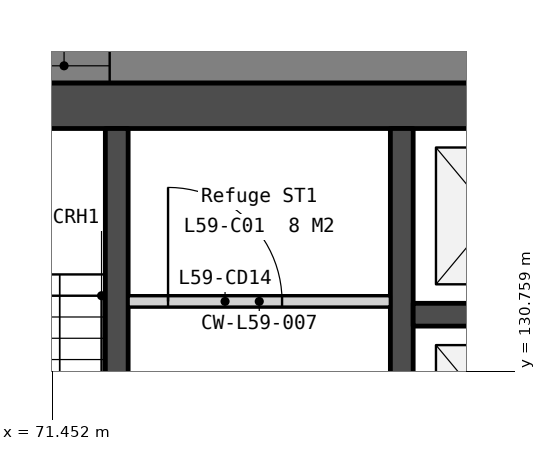
"""IFC4 building model, lengths in metres.
Left out: names, types, materials, properties, quantities, classifications, styles, units other than length and angle.
Written with IfcOpenShell. Run it as: python <this file> out.ifc"""

import sys

from ifc_helpers import new_model, si_unit, direction, frame, frame_2d, origin, place, context, subcontext, project, spatial, polyline, rectangle, outline, extrude, element, fill, save


model = new_model("IFC4")
c1 = context("Model", 3, precision=1e-05, world=origin(), true_north=direction((0.0, 1.0)))
c2 = subcontext(c1, "Body", "Model", "MODEL_VIEW")
j1 = project(units=[si_unit("LENGTHUNIT", "METRE"), si_unit("PLANEANGLEUNIT", "RADIAN")], contexts=[c1])
p1 = place(None, origin())
s1 = spatial("IfcSite", under=j1, at=p1, CompositionType="ELEMENT")
p2 = place(p1, origin())
s2 = spatial("IfcBuilding", under=s1, at=p2, CompositionType="ELEMENT")
p3 = place(p2, frame((0.0, 0.0, 242.6)))
s3 = spatial("IfcBuildingStorey", under=s2, at=p3, CompositionType="ELEMENT", Elevation=242.6)
p4 = place(p3, frame((69.0, 134.25, 0.0), z_axis=(0.0, 0.0, 1.0), x_axis=(1.0, 0.0, 0.0)))
e1 = element("IfcWall", 1, at=p4, inside=s3, PredefinedType="SOLIDWALL", context=c2, shape_type="SweptSolid", body=[
    extrude(rectangle(XDim=22.0, YDim=0.6, at=frame_2d((11.0, 0.0))), origin(), (0.0, 0.0, 1.0), 3.75),
])
p5 = place(p3, frame((72.3, 133.95, 0.0), z_axis=(0.0, 0.0, 1.0), x_axis=(0.0, -1.0, 0.0)))
e2 = element("IfcWall", 2, at=p5, inside=s3, PredefinedType="SOLIDWALL", context=c2, shape_type="SweptSolid", body=[
    extrude(rectangle(XDim=10.8, YDim=0.3, at=frame_2d((5.4, 0.0))), origin(), (0.0, 0.0, 1.0), 3.75),
])
p6 = place(p5, frame((6.95, 0.0, 0.0)))
e3 = element("IfcOpeningElement", 3, at=p6, cuts=e2, PredefinedType="OPENING", context=c2, shape_type="SweptSolid", body=[
    extrude(rectangle(XDim=1.1, YDim=2.1, at=frame_2d((0.55, 1.05))), frame((0.0, 0.16, 0.0), z_axis=(0.0, -1.0, 0.0), x_axis=(1.0, 0.0, 0.0)), (0.0, 0.0, 1.0), 0.32),
])
p7 = place(p5, frame((9.35, 0.0, 0.0)))
e4 = element("IfcOpeningElement", 4, at=p7, cuts=e2, PredefinedType="OPENING", context=c2, shape_type="SweptSolid", body=[
    extrude(rectangle(XDim=0.9, YDim=2.1, at=frame_2d((0.45, 1.05))), frame((0.0, 0.16, 0.0), z_axis=(0.0, -1.0, 0.0), x_axis=(1.0, 0.0, 0.0)), (0.0, 0.0, 1.0), 0.32),
])
p8 = place(p5, frame((5.1, 0.0, 0.0)))
e5 = element("IfcOpeningElement", 5, at=p8, cuts=e2, PredefinedType="OPENING", context=c2, shape_type="SweptSolid", body=[
    extrude(rectangle(XDim=1.0, YDim=2.1, at=frame_2d((0.5, 1.05))), frame((0.0, 0.16, 0.0), z_axis=(0.0, -1.0, 0.0), x_axis=(1.0, 0.0, 0.0)), (0.0, 0.0, 1.0), 0.32),
])
p9 = place(p3, frame((72.45, 131.675, 0.0), z_axis=(0.0, 0.0, 1.0), x_axis=(1.0, 0.0, 0.0)))
e6 = element("IfcWall", 6, at=p9, inside=s3, PredefinedType="PARTITIONING", context=c2, shape_type="SweptSolid", body=[
    extrude(rectangle(XDim=3.45, YDim=0.15, at=frame_2d((1.725, 0.0))), origin(), (0.0, 0.0, 1.0), 3.75),
])
p10 = place(p9, frame((0.525, 0.0, 0.0)))
e7 = element("IfcOpeningElement", 7, at=p10, cuts=e6, PredefinedType="OPENING", context=c2, shape_type="SweptSolid", body=[
    extrude(rectangle(XDim=1.5, YDim=2.1, at=frame_2d((0.75, 1.05))), frame((0.0, 0.085, 0.0), z_axis=(0.0, -1.0, 0.0), x_axis=(1.0, 0.0, 0.0)), (0.0, 0.0, 1.0), 0.17),
])
p11 = place(p3, frame((76.05, 133.95, 0.0), z_axis=(0.0, 0.0, 1.0), x_axis=(0.0, -1.0, 0.0)))
e8 = element("IfcWall", 8, at=p11, inside=s3, PredefinedType="SOLIDWALL", context=c2, shape_type="SweptSolid", body=[
    extrude(rectangle(XDim=8.25, YDim=0.3, at=frame_2d((4.125, 0.0))), origin(), (0.0, 0.0, 1.0), 3.75),
])
p12 = place(p3, frame((76.2, 131.5, 0.0), z_axis=(0.0, 0.0, 1.0), x_axis=(1.0, 0.0, 0.0)))
e9 = element("IfcWall", 9, at=p12, inside=s3, PredefinedType="SOLIDWALL", context=c2, shape_type="SweptSolid", body=[
    extrude(rectangle(XDim=2.1, YDim=0.3, at=frame_2d((1.05, 0.0))), origin(), (0.0, 0.0, 1.0), 3.75),
])
p13 = place(p3, frame((98.486, 134.775, -0.15), z_axis=(0.0, 0.0, 1.0), x_axis=(-1.0, 0.0, 0.0)))
e10 = element("IfcWall", 10, at=p13, inside=s3, PredefinedType="SOLIDWALL", context=c2, shape_type="SweptSolid", body=[
    extrude(outline(polyline([(36.972, 0.0), (36.972, 3.9), (0.0, 3.9), (0.0, 0.0), (36.972, 0.0)])), frame((0.0, 0.225, 0.0), z_axis=(0.0, -1.0, 0.0), x_axis=(1.0, 0.0, 0.0)), (0.0, 0.0, 1.0), 0.45),
])
p14 = place(p13, frame((0.715, 0.0, 0.95)))
e11 = element("IfcOpeningElement", 11, at=p14, cuts=e10, PredefinedType="OPENING", context=c2, shape_type="SweptSolid", body=[
    extrude(rectangle(XDim=1.2, YDim=2.2, at=frame_2d((0.6, 1.1))), frame((0.0, 0.235, 0.0), z_axis=(0.0, -1.0, 0.0), x_axis=(1.0, 0.0, 0.0)), (0.0, 0.0, 1.0), 0.47),
])
p15 = place(p13, frame((7.793, 0.0, 0.95)))
e12 = element("IfcOpeningElement", 12, at=p15, cuts=e10, PredefinedType="OPENING", context=c2, shape_type="SweptSolid", body=[
    extrude(rectangle(XDim=1.2, YDim=2.2, at=frame_2d((0.6, 1.1))), frame((0.0, 0.235, 0.0), z_axis=(0.0, -1.0, 0.0), x_axis=(1.0, 0.0, 0.0)), (0.0, 0.0, 1.0), 0.47),
])
p16 = place(p13, frame((9.493, 0.0, 0.95)))
e13 = element("IfcOpeningElement", 13, at=p16, cuts=e10, PredefinedType="OPENING", context=c2, shape_type="SweptSolid", body=[
    extrude(rectangle(XDim=1.2, YDim=2.2, at=frame_2d((0.6, 1.1))), frame((0.0, 0.235, 0.0), z_axis=(0.0, -1.0, 0.0), x_axis=(1.0, 0.0, 0.0)), (0.0, 0.0, 1.0), 0.47),
])
p17 = place(p13, frame((17.036, 0.0, 0.95)))
e14 = element("IfcOpeningElement", 14, at=p17, cuts=e10, PredefinedType="OPENING", context=c2, shape_type="SweptSolid", body=[
    extrude(rectangle(XDim=1.2, YDim=2.2, at=frame_2d((0.6, 1.1))), frame((0.0, 0.235, 0.0), z_axis=(0.0, -1.0, 0.0), x_axis=(1.0, 0.0, 0.0)), (0.0, 0.0, 1.0), 0.47),
])
p18 = place(p13, frame((18.736, 0.0, 0.95)))
e15 = element("IfcOpeningElement", 15, at=p18, cuts=e10, PredefinedType="OPENING", context=c2, shape_type="SweptSolid", body=[
    extrude(rectangle(XDim=1.2, YDim=2.2, at=frame_2d((0.6, 1.1))), frame((0.0, 0.235, 0.0), z_axis=(0.0, -1.0, 0.0), x_axis=(1.0, 0.0, 0.0)), (0.0, 0.0, 1.0), 0.47),
])
p19 = place(p13, frame((26.279, 0.0, 0.95)))
e16 = element("IfcOpeningElement", 16, at=p19, cuts=e10, PredefinedType="OPENING", context=c2, shape_type="SweptSolid", body=[
    extrude(rectangle(XDim=1.2, YDim=2.2, at=frame_2d((0.6, 1.1))), frame((0.0, 0.235, 0.0), z_axis=(0.0, -1.0, 0.0), x_axis=(1.0, 0.0, 0.0)), (0.0, 0.0, 1.0), 0.47),
])
p20 = place(p13, frame((27.979, 0.0, 0.95)))
e17 = element("IfcOpeningElement", 17, at=p20, cuts=e10, PredefinedType="OPENING", context=c2, shape_type="SweptSolid", body=[
    extrude(rectangle(XDim=1.2, YDim=2.2, at=frame_2d((0.6, 1.1))), frame((0.0, 0.235, 0.0), z_axis=(0.0, -1.0, 0.0), x_axis=(1.0, 0.0, 0.0)), (0.0, 0.0, 1.0), 0.47),
])
p21 = place(p13, frame((35.058, 0.0, 0.95)))
e18 = element("IfcOpeningElement", 18, at=p21, cuts=e10, PredefinedType="OPENING", context=c2, shape_type="SweptSolid", body=[
    extrude(rectangle(XDim=1.2, YDim=2.2, at=frame_2d((0.6, 1.1))), frame((0.0, 0.235, 0.0), z_axis=(0.0, -1.0, 0.0), x_axis=(1.0, 0.0, 0.0)), (0.0, 0.0, 1.0), 0.47),
])
p22 = place(p3, frame((60.609, 133.207, -0.15), z_axis=(0.0, 0.0, 1.0), x_axis=(0.500002536638, -0.866023939251, 0.0)))
e19 = element("IfcWall", 19, at=p22, inside=s3, PredefinedType="SOLIDWALL", context=c2, shape_type="SweptSolid", body=[
    extrude(outline(polyline([(36.972, 0.0), (36.972, 3.9), (0.0, 3.9), (0.0, 0.0), (36.972, 0.0)])), frame((0.0, 0.225, 0.0), z_axis=(0.0, -1.0, 0.0), x_axis=(1.0, 0.0, 0.0)), (0.0, 0.0, 1.0), 0.45),
])
p23 = place(p22, frame((0.715, 0.0, 0.95)))
e20 = element("IfcOpeningElement", 20, at=p23, cuts=e19, PredefinedType="OPENING", context=c2, shape_type="SweptSolid", body=[
    extrude(rectangle(XDim=1.2, YDim=2.2, at=frame_2d((0.6, 1.1))), frame((0.0, 0.235, 0.0), z_axis=(0.0, -1.0, 0.0), x_axis=(1.0, 0.0, 0.0)), (0.0, 0.0, 1.0), 0.47),
])
p24 = place(p22, frame((7.793, 0.0, 0.95)))
e21 = element("IfcOpeningElement", 21, at=p24, cuts=e19, PredefinedType="OPENING", context=c2, shape_type="SweptSolid", body=[
    extrude(rectangle(XDim=1.2, YDim=2.2, at=frame_2d((0.6, 1.1))), frame((0.0, 0.235, 0.0), z_axis=(0.0, -1.0, 0.0), x_axis=(1.0, 0.0, 0.0)), (0.0, 0.0, 1.0), 0.47),
])
p25 = place(p22, frame((9.493, 0.0, 0.95)))
e22 = element("IfcOpeningElement", 22, at=p25, cuts=e19, PredefinedType="OPENING", context=c2, shape_type="SweptSolid", body=[
    extrude(rectangle(XDim=1.2, YDim=2.2, at=frame_2d((0.6, 1.1))), frame((0.0, 0.235, 0.0), z_axis=(0.0, -1.0, 0.0), x_axis=(1.0, 0.0, 0.0)), (0.0, 0.0, 1.0), 0.47),
])
p26 = place(p22, frame((17.036, 0.0, 0.95)))
e23 = element("IfcOpeningElement", 23, at=p26, cuts=e19, PredefinedType="OPENING", context=c2, shape_type="SweptSolid", body=[
    extrude(rectangle(XDim=1.2, YDim=2.2, at=frame_2d((0.6, 1.1))), frame((0.0, 0.235, 0.0), z_axis=(0.0, -1.0, 0.0), x_axis=(1.0, 0.0, 0.0)), (0.0, 0.0, 1.0), 0.47),
])
p27 = place(p22, frame((18.736, 0.0, 0.95)))
e24 = element("IfcOpeningElement", 24, at=p27, cuts=e19, PredefinedType="OPENING", context=c2, shape_type="SweptSolid", body=[
    extrude(rectangle(XDim=1.2, YDim=2.2, at=frame_2d((0.6, 1.1))), frame((0.0, 0.235, 0.0), z_axis=(0.0, -1.0, 0.0), x_axis=(1.0, 0.0, 0.0)), (0.0, 0.0, 1.0), 0.47),
])
p28 = place(p22, frame((26.279, 0.0, 0.95)))
e25 = element("IfcOpeningElement", 25, at=p28, cuts=e19, PredefinedType="OPENING", context=c2, shape_type="SweptSolid", body=[
    extrude(rectangle(XDim=1.2, YDim=2.2, at=frame_2d((0.6, 1.1))), frame((0.0, 0.235, 0.0), z_axis=(0.0, -1.0, 0.0), x_axis=(1.0, 0.0, 0.0)), (0.0, 0.0, 1.0), 0.47),
])
p29 = place(p22, frame((27.979, 0.0, 0.95)))
e26 = element("IfcOpeningElement", 26, at=p29, cuts=e19, PredefinedType="OPENING", context=c2, shape_type="SweptSolid", body=[
    extrude(rectangle(XDim=1.2, YDim=2.2, at=frame_2d((0.6, 1.1))), frame((0.0, 0.235, 0.0), z_axis=(0.0, -1.0, 0.0), x_axis=(1.0, 0.0, 0.0)), (0.0, 0.0, 1.0), 0.47),
])
p30 = place(p22, frame((35.058, 0.0, 0.95)))
e27 = element("IfcOpeningElement", 27, at=p30, cuts=e19, PredefinedType="OPENING", context=c2, shape_type="SweptSolid", body=[
    extrude(rectangle(XDim=1.2, YDim=2.2, at=frame_2d((0.6, 1.1))), frame((0.0, 0.235, 0.0), z_axis=(0.0, -1.0, 0.0), x_axis=(1.0, 0.0, 0.0)), (0.0, 0.0, 1.0), 0.47),
])
p31 = place(p10, origin())
e28 = element("IfcDoor", 28, at=p31, inside=s3, OperationType="DOUBLE_DOOR_DOUBLE_SWING", PredefinedType="DOOR", context=c2, shape_type="SweptSolid", body=[
    extrude(rectangle(XDim=1.5, YDim=2.1, at=frame_2d((0.75, 1.05))), frame((0.0, 0.025, 0.0), z_axis=(0.0, -1.0, 0.0), x_axis=(1.0, 0.0, 0.0)), (0.0, 0.0, 1.0), 0.05),
])
fill(e7, e28)
p32 = place(p19, origin())
e29 = element("IfcWindow", 29, at=p32, inside=s3, PartitioningType="SINGLE_PANEL", PredefinedType="WINDOW", context=c2, shape_type="SweptSolid", body=[
    extrude(rectangle(XDim=1.2, YDim=2.2, at=frame_2d((0.6, 1.1))), frame((0.0, 0.03, 0.0), z_axis=(0.0, -1.0, 0.0), x_axis=(1.0, 0.0, 0.0)), (0.0, 0.0, 1.0), 0.06),
])
fill(e16, e29)
save(model, sys.argv[1])
